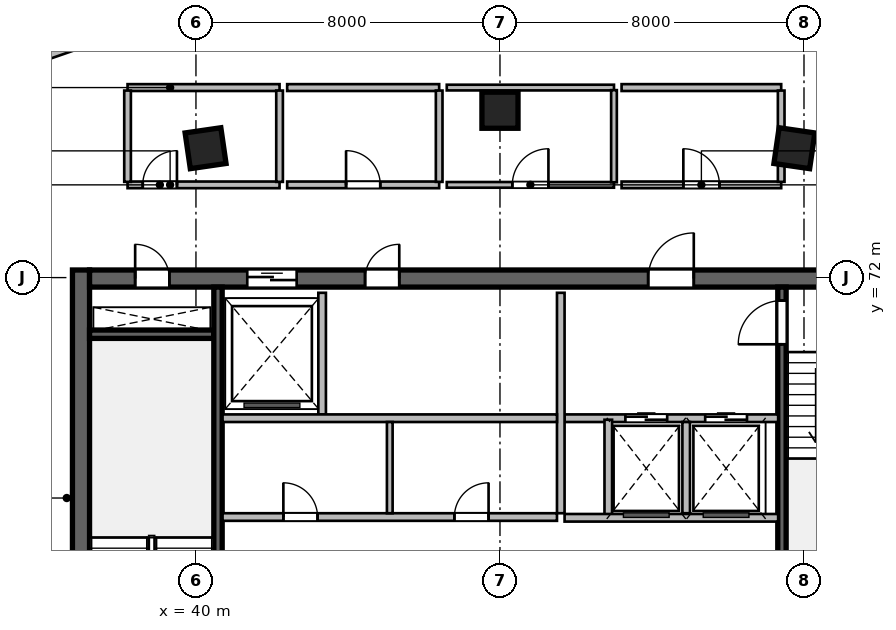
"""IFC4 building model, lengths in metres.
Left out: names, types, materials, properties, quantities, classifications, styles, units other than length and angle.
Written with IfcOpenShell. Run it as: python <this file> out.ifc"""

import sys

from ifc_helpers import new_model, si_unit, direction, frame, frame_2d, origin, origin_2d, place, context, subcontext, project, spatial, rectangle, extrude, source, transform, mapped, element, fill, save


model = new_model("IFC4")
c1 = context("Model", 3, precision=1e-05, world=origin(), true_north=direction((0.0, 1.0)))
c2 = subcontext(c1, "Body", "Model", "MODEL_VIEW")
j1 = project(units=[si_unit("LENGTHUNIT", "METRE"), si_unit("PLANEANGLEUNIT", "RADIAN")], contexts=[c1])
p1 = place(None, origin())
s1 = spatial("IfcSite", under=j1, at=p1, CompositionType="ELEMENT")
p2 = place(p1, origin())
s2 = spatial("IfcBuilding", under=s1, at=p2, CompositionType="ELEMENT")
p3 = place(p2, frame((0.0, 0.0, 215.7)))
s3 = spatial("IfcBuildingStorey", under=s2, at=p3, CompositionType="ELEMENT", Elevation=215.7)
m1 = source(origin(), c2, "Body", "SweptSolid", [
    extrude(rectangle(XDim=12.0, YDim=0.45, at=frame_2d((6.0, 0.0))), origin(), (0.0, 0.0, 1.0), 3.9),
])
p4 = place(p3, frame((36.975, 60.2, 0.0), z_axis=(0.0, 0.0, 1.0), x_axis=(0.0, 1.0, 0.0)))
e1 = element("IfcWall", 1, at=p4, inside=s3, PredefinedType="SHEAR", context=c2, shape_type="MappedRepresentation", body=[
    mapped(m1, transform((0.0, 0.0, 0.0), scale=1.0)),
])
m2 = source(origin(), c2, "Body", "SweptSolid", [
    extrude(rectangle(XDim=21.6, YDim=0.45, at=frame_2d((10.8, 0.0))), origin(), (0.0, 0.0, 1.0), 3.9),
])
p5 = place(p3, frame((37.2, 71.975, 0.0), z_axis=(0.0, 0.0, 1.0), x_axis=(1.0, 0.0, 0.0)))
e2 = element("IfcWall", 2, at=p5, inside=s3, PredefinedType="SHEAR", context=c2, shape_type="MappedRepresentation", body=[
    mapped(m2, transform((0.0, 0.0, 0.0), scale=1.0)),
])
p6 = place(p5, frame((1.2, 0.0, 0.0)))
e3 = element("IfcOpeningElement", 3, at=p6, cuts=e2, PredefinedType="OPENING", context=c2, shape_type="SweptSolid", body=[
    extrude(rectangle(XDim=0.9, YDim=2.1, at=frame_2d((0.45, 1.05))), frame((0.0, 0.235, 0.0), z_axis=(0.0, -1.0, 0.0), x_axis=(1.0, 0.0, 0.0)), (0.0, 0.0, 1.0), 0.47),
])
p7 = place(p5, frame((14.7, 0.0, 0.0)))
e4 = element("IfcOpeningElement", 4, at=p7, cuts=e2, PredefinedType="OPENING", context=c2, shape_type="SweptSolid", body=[
    extrude(rectangle(XDim=1.2, YDim=2.15, at=frame_2d((0.6, 1.075))), frame((0.0, 0.235, 0.0), z_axis=(0.0, -1.0, 0.0), x_axis=(1.0, 0.0, 0.0)), (0.0, 0.0, 1.0), 0.47),
])
p8 = place(p5, frame((4.15, 0.0, 0.0)))
e5 = element("IfcOpeningElement", 5, at=p8, cuts=e2, PredefinedType="OPENING", context=c2, shape_type="SweptSolid", body=[
    extrude(rectangle(XDim=1.3, YDim=2.15, at=frame_2d((0.65, 1.075))), frame((0.0, 0.235, 0.0), z_axis=(0.0, -1.0, 0.0), x_axis=(1.0, 0.0, 0.0)), (0.0, 0.0, 1.0), 0.47),
])
p9 = place(p5, frame((7.25, 0.0, 0.0)))
e6 = element("IfcOpeningElement", 6, at=p9, cuts=e2, PredefinedType="OPENING", context=c2, shape_type="SweptSolid", body=[
    extrude(rectangle(XDim=0.9, YDim=2.1, at=frame_2d((0.45, 1.05))), frame((0.0, 0.235, 0.0), z_axis=(0.0, -1.0, 0.0), x_axis=(1.0, 0.0, 0.0)), (0.0, 0.0, 1.0), 0.47),
])
m3 = source(origin(), c2, "Body", "SweptSolid", [
    extrude(rectangle(XDim=3.27, YDim=0.22, at=frame_2d((1.635, 0.0))), origin(), (0.0, 0.0, 1.0), 3.9),
])
p10 = place(p3, frame((37.2, 70.51, 0.0), z_axis=(0.0, 0.0, 1.0), x_axis=(1.0, 0.0, 0.0)))
e7 = element("IfcWall", 7, at=p10, inside=s3, PredefinedType="SHEAR", context=c2, shape_type="MappedRepresentation", body=[
    mapped(m3, transform((0.0, 0.0, 0.0), scale=1.0)),
])
m4 = source(origin(), c2, "Body", "SweptSolid", [
    extrude(rectangle(XDim=11.1, YDim=0.22, at=frame_2d((5.55, 0.0))), origin(), (0.0, 0.0, 1.0), 3.9),
])
p11 = place(p3, frame((40.58, 60.65, 0.0), z_axis=(0.0, 0.0, 1.0), x_axis=(0.0, 1.0, 0.0)))
e8 = element("IfcWall", 8, at=p11, inside=s3, PredefinedType="SHEAR", context=c2, shape_type="MappedRepresentation", body=[
    mapped(m4, transform((0.0, 0.0, 0.0), scale=1.0)),
])
p12 = place(p3, frame((55.42, 60.65, 0.0), z_axis=(0.0, 0.0, 1.0), x_axis=(0.0, 1.0, 0.0)))
e9 = element("IfcWall", 9, at=p12, inside=s3, PredefinedType="SHEAR", context=c2, shape_type="MappedRepresentation", body=[
    mapped(m4, transform((0.0, 0.0, 0.0), scale=1.0)),
])
p13 = place(p12, frame((9.595, 0.0, 0.0)))
e10 = element("IfcOpeningElement", 10, at=p13, cuts=e9, PredefinedType="OPENING", context=c2, shape_type="SweptSolid", body=[
    extrude(rectangle(XDim=1.15, YDim=2.15, at=frame_2d((0.575, 1.075))), frame((0.0, 0.12, 0.0), z_axis=(0.0, -1.0, 0.0), x_axis=(1.0, 0.0, 0.0)), (0.0, 0.0, 1.0), 0.24),
])
m5 = source(origin(), c2, "Body", "SweptSolid", [
    extrude(rectangle(XDim=0.95, YDim=0.95, at=origin_2d()), origin(), (0.0, 0.0, 1.0), 3.9),
])
for number, where, z_axis, x_axis in (
    (11, (40.253, 75.404, 0.0), (0.0, 0.0, 1.0), (-0.143, 0.99, 0.0)),
    (12, (48.0, 76.404, 0.0), (0.0, 0.0, 1.0), (0.0, 1.0, 0.0)),
    (13, (55.747, 75.404, 0.0), (0.0, 0.0, 1.0), (0.143, 0.99, 0.0)),
):
    element("IfcColumn", number, at=place(p3, frame(where, z_axis=z_axis, x_axis=x_axis)), inside=s3, PredefinedType="COLUMN", context=c2, shape_type="MappedRepresentation", body=[
        mapped(m5, transform((0.0, 0.0, 0.0), scale=1.0)),
    ])
m6 = source(origin(), c2, "Body", "SweptSolid", [
    extrude(rectangle(XDim=4.492, YDim=0.28, at=frame_2d((2.246, 0.0))), origin(), (0.0, 0.0, 1.0), 3.64),
])
p14 = place(p3, frame((35.046, 77.52, 0.0), z_axis=(0.0, 0.0, 1.0), x_axis=(0.944872297412, 0.32743906545, 0.0)))
e14 = element("IfcWall", 14, at=p14, inside=s3, PredefinedType="SOLIDWALL", context=c2, shape_type="MappedRepresentation", body=[
    mapped(m6, transform((0.0, 0.0, 0.0), scale=1.0)),
])
m7 = source(origin(), c2, "Body", "SweptSolid", [
    extrude(rectangle(XDim=5.62, YDim=0.2, at=frame_2d((2.81, 0.0))), origin(), (0.0, 0.0, 1.0), 3.64),
])
p15 = place(p3, frame((49.7, 68.3, 0.0), z_axis=(0.0, 0.0, 1.0), x_axis=(1.0, 0.0, 0.0)))
e15 = element("IfcWall", 15, at=p15, inside=s3, PredefinedType="SOLIDWALL", context=c2, shape_type="MappedRepresentation", body=[
    mapped(m7, transform((0.0, 0.0, 0.0), scale=1.0)),
])
p16 = place(p15, frame((1.6, 0.0, 0.0)))
e16 = element("IfcOpeningElement", 16, at=p16, cuts=e15, PredefinedType="OPENING", context=c2, shape_type="SweptSolid", body=[
    extrude(rectangle(XDim=1.1, YDim=2.15, at=frame_2d((0.55, 1.075))), frame((0.0, 0.11, 0.0), z_axis=(0.0, -1.0, 0.0), x_axis=(1.0, 0.0, 0.0)), (0.0, 0.0, 1.0), 0.22),
])
p17 = place(p15, frame((3.7, 0.0, 0.0)))
e17 = element("IfcOpeningElement", 17, at=p17, cuts=e15, PredefinedType="OPENING", context=c2, shape_type="SweptSolid", body=[
    extrude(rectangle(XDim=1.1, YDim=2.15, at=frame_2d((0.55, 1.075))), frame((0.0, 0.11, 0.0), z_axis=(0.0, -1.0, 0.0), x_axis=(1.0, 0.0, 0.0)), (0.0, 0.0, 1.0), 0.22),
])
m8 = source(origin(), c2, "Body", "SweptSolid", [
    extrude(rectangle(XDim=5.8, YDim=0.2, at=frame_2d((2.9, 0.0))), origin(), (0.0, 0.0, 1.0), 3.64),
])
p18 = place(p3, frame((49.6, 65.8, 0.0), z_axis=(0.0, 0.0, 1.0), x_axis=(0.0, 1.0, 0.0)))
e18 = element("IfcWall", 18, at=p18, inside=s3, PredefinedType="SOLIDWALL", context=c2, shape_type="MappedRepresentation", body=[
    mapped(m8, transform((0.0, 0.0, 0.0), scale=1.0)),
])
m9 = source(origin(), c2, "Body", "SweptSolid", [
    extrude(rectangle(XDim=2.58, YDim=0.2, at=frame_2d((1.29, 0.0))), origin(), (0.0, 0.0, 1.0), 3.64),
])
p19 = place(p3, frame((50.85, 65.68, 0.0), z_axis=(0.0, 0.0, 1.0), x_axis=(0.0, 1.0, 0.0)))
e19 = element("IfcWall", 19, at=p19, inside=s3, PredefinedType="SOLIDWALL", context=c2, shape_type="MappedRepresentation", body=[
    mapped(m9, transform((0.0, 0.0, 0.0), scale=1.0)),
])
m10 = source(origin(), c2, "Body", "SweptSolid", [
    extrude(rectangle(XDim=2.4, YDim=0.2, at=frame_2d((1.2, 0.0))), origin(), (0.0, 0.0, 1.0), 3.64),
])
p20 = place(p3, frame((52.9, 65.8, 0.0), z_axis=(0.0, 0.0, 1.0), x_axis=(0.0, 1.0, 0.0)))
e20 = element("IfcWall", 20, at=p20, inside=s3, PredefinedType="SOLIDWALL", context=c2, shape_type="MappedRepresentation", body=[
    mapped(m10, transform((0.0, 0.0, 0.0), scale=1.0)),
])
p21 = place(p3, frame((49.7, 65.68, 0.0), z_axis=(0.0, 0.0, 1.0), x_axis=(1.0, 0.0, 0.0)))
e21 = element("IfcWall", 21, at=p21, inside=s3, PredefinedType="SOLIDWALL", context=c2, shape_type="MappedRepresentation", body=[
    mapped(m7, transform((0.0, 0.0, 0.0), scale=1.0)),
])
m11 = source(origin(), c2, "Body", "SweptSolid", [
    extrude(rectangle(XDim=3.2, YDim=0.2, at=frame_2d((1.6, 0.0))), origin(), (0.0, 0.0, 1.0), 3.64),
])
p22 = place(p3, frame((43.32, 68.4, 0.0), z_axis=(0.0, 0.0, 1.0), x_axis=(0.0, 1.0, 0.0)))
e22 = element("IfcWall", 22, at=p22, inside=s3, PredefinedType="SOLIDWALL", context=c2, shape_type="MappedRepresentation", body=[
    mapped(m11, transform((0.0, 0.0, 0.0), scale=1.0)),
])
m12 = source(origin(), c2, "Body", "SweptSolid", [
    extrude(rectangle(XDim=8.8, YDim=0.2, at=frame_2d((4.4, 0.0))), origin(), (0.0, 0.0, 1.0), 3.64),
])
p23 = place(p3, frame((40.7, 68.3, 0.0), z_axis=(0.0, 0.0, 1.0), x_axis=(1.0, 0.0, 0.0)))
e23 = element("IfcWall", 23, at=p23, inside=s3, PredefinedType="SOLIDWALL", context=c2, shape_type="MappedRepresentation", body=[
    mapped(m12, transform((0.0, 0.0, 0.0), scale=1.0)),
])
p24 = place(p3, frame((40.7, 65.7, 0.0), z_axis=(0.0, 0.0, 1.0), x_axis=(1.0, 0.0, 0.0)))
e24 = element("IfcWall", 24, at=p24, inside=s3, PredefinedType="SOLIDWALL", context=c2, shape_type="MappedRepresentation", body=[
    mapped(m12, transform((0.0, 0.0, 0.0), scale=1.0)),
])
p25 = place(p24, frame((1.6, 0.0, 0.0)))
e25 = element("IfcOpeningElement", 25, at=p25, cuts=e24, PredefinedType="OPENING", context=c2, shape_type="SweptSolid", body=[
    extrude(rectangle(XDim=0.9, YDim=2.1, at=frame_2d((0.45, 1.05))), frame((0.0, 0.11, 0.0), z_axis=(0.0, -1.0, 0.0), x_axis=(1.0, 0.0, 0.0)), (0.0, 0.0, 1.0), 0.22),
])
p26 = place(p24, frame((6.1, 0.0, 0.0)))
e26 = element("IfcOpeningElement", 26, at=p26, cuts=e24, PredefinedType="OPENING", context=c2, shape_type="SweptSolid", body=[
    extrude(rectangle(XDim=0.9, YDim=2.1, at=frame_2d((0.45, 1.05))), frame((0.0, 0.11, 0.0), z_axis=(0.0, -1.0, 0.0), x_axis=(1.0, 0.0, 0.0)), (0.0, 0.0, 1.0), 0.22),
])
m13 = source(origin(), c2, "Body", "SweptSolid", [
    extrude(rectangle(XDim=2.4, YDim=0.15, at=frame_2d((1.2, 0.0))), origin(), (0.0, 0.0, 1.0), 3.64),
])
p27 = place(p3, frame((45.1, 65.8, 0.0), z_axis=(0.0, 0.0, 1.0), x_axis=(0.0, 1.0, 0.0)))
e27 = element("IfcWall", 27, at=p27, inside=s3, PredefinedType="PARTITIONING", context=c2, shape_type="MappedRepresentation", body=[
    mapped(m13, transform((0.0, 0.0, 0.0), scale=1.0)),
])
m14 = source(origin(), c2, "Body", "SweptSolid", [
    extrude(rectangle(XDim=4.0, YDim=0.175, at=frame_2d((2.0, 0.0))), origin(), (0.0, 0.0, 1.0), 3.64),
])
p28 = place(p3, frame((38.2, 74.44, 0.0), z_axis=(0.0, 0.0, 1.0), x_axis=(1.0, 0.0, 0.0)))
e28 = element("IfcWall", 28, at=p28, inside=s3, PredefinedType="PARTITIONING", context=c2, shape_type="MappedRepresentation", body=[
    mapped(m14, transform((0.0, 0.0, 0.0), scale=1.0)),
])
p29 = place(p28, frame((0.4, 0.0, 0.0)))
e29 = element("IfcOpeningElement", 29, at=p29, cuts=e28, PredefinedType="OPENING", context=c2, shape_type="SweptSolid", body=[
    extrude(rectangle(XDim=0.9, YDim=2.08, at=frame_2d((0.45, 1.04))), frame((0.0, 0.098, 0.0), z_axis=(0.0, -1.0, 0.0), x_axis=(1.0, 0.0, 0.0)), (0.0, 0.0, 1.0), 0.195),
])
m15 = source(origin(), c2, "Body", "SweptSolid", [
    extrude(rectangle(XDim=4.0, YDim=0.18, at=frame_2d((2.0, 0.0))), origin(), (0.0, 0.0, 1.0), 3.64),
])
p30 = place(p3, frame((38.2, 77.0, 0.0), z_axis=(0.0, 0.0, 1.0), x_axis=(1.0, 0.0, 0.0)))
e30 = element("IfcWall", 30, at=p30, inside=s3, PredefinedType="PLUMBINGWALL", context=c2, shape_type="MappedRepresentation", body=[
    mapped(m15, transform((0.0, 0.0, 0.0), scale=1.0)),
])
m16 = source(origin(), c2, "Body", "SweptSolid", [
    extrude(rectangle(XDim=2.403, YDim=0.175, at=frame_2d((1.201, 0.0))), origin(), (0.0, 0.0, 1.0), 3.64),
])
for number, where, z_axis, x_axis in (
    (31, (38.2, 74.519, 0.0), (0.0, 0.0, 1.0), (0.0, 1.0, 0.0)),
    (32, (42.2, 74.519, 0.0), (0.0, 0.0, 1.0), (0.0, 1.0, 0.0)),
):
    element("IfcWall", number, at=place(p3, frame(where, z_axis=z_axis, x_axis=x_axis)), inside=s3, PredefinedType="PARTITIONING", context=c2, shape_type="MappedRepresentation", body=[
        mapped(m16, transform((0.0, 0.0, 0.0), scale=1.0)),
    ])
p31 = place(p3, frame((42.4, 74.44, 0.0), z_axis=(0.0, 0.0, 1.0), x_axis=(1.0, 0.0, 0.0)))
e33 = element("IfcWall", 33, at=p31, inside=s3, PredefinedType="PARTITIONING", context=c2, shape_type="MappedRepresentation", body=[
    mapped(m14, transform((0.0, 0.0, 0.0), scale=1.0)),
])
p32 = place(p31, frame((1.55, 0.0, 0.0)))
e34 = element("IfcOpeningElement", 34, at=p32, cuts=e33, PredefinedType="OPENING", context=c2, shape_type="SweptSolid", body=[
    extrude(rectangle(XDim=0.9, YDim=2.08, at=frame_2d((0.45, 1.04))), frame((0.0, 0.098, 0.0), z_axis=(0.0, -1.0, 0.0), x_axis=(1.0, 0.0, 0.0)), (0.0, 0.0, 1.0), 0.195),
])
p33 = place(p3, frame((42.4, 77.0, 0.0), z_axis=(0.0, 0.0, 1.0), x_axis=(1.0, 0.0, 0.0)))
e35 = element("IfcWall", 35, at=p33, inside=s3, PredefinedType="PLUMBINGWALL", context=c2, shape_type="MappedRepresentation", body=[
    mapped(m15, transform((0.0, 0.0, 0.0), scale=1.0)),
])
p34 = place(p3, frame((46.4, 74.519, 0.0), z_axis=(0.0, 0.0, 1.0), x_axis=(0.0, 1.0, 0.0)))
e36 = element("IfcWall", 36, at=p34, inside=s3, PredefinedType="PARTITIONING", context=c2, shape_type="MappedRepresentation", body=[
    mapped(m16, transform((0.0, 0.0, 0.0), scale=1.0)),
])
m17 = source(origin(), c2, "Body", "SweptSolid", [
    extrude(rectangle(XDim=4.4, YDim=0.15, at=frame_2d((2.2, 0.0))), origin(), (0.0, 0.0, 1.0), 3.64),
])
p35 = place(p3, frame((46.6, 74.44, 0.0), z_axis=(0.0, 0.0, 1.0), x_axis=(1.0, 0.0, 0.0)))
e37 = element("IfcWall", 37, at=p35, inside=s3, PredefinedType="PARTITIONING", context=c2, shape_type="MappedRepresentation", body=[
    mapped(m17, transform((0.0, 0.0, 0.0), scale=1.0)),
])
p36 = place(p35, frame((1.725, 0.0, 0.0)))
e38 = element("IfcOpeningElement", 38, at=p36, cuts=e37, PredefinedType="OPENING", context=c2, shape_type="SweptSolid", body=[
    extrude(rectangle(XDim=0.95, YDim=2.1, at=frame_2d((0.475, 1.05))), frame((0.0, 0.085, 0.0), z_axis=(0.0, -1.0, 0.0), x_axis=(1.0, 0.0, 0.0)), (0.0, 0.0, 1.0), 0.17),
])
p37 = place(p3, frame((46.6, 77.0, 0.0), z_axis=(0.0, 0.0, 1.0), x_axis=(1.0, 0.0, 0.0)))
e39 = element("IfcWall", 39, at=p37, inside=s3, PredefinedType="PARTITIONING", context=c2, shape_type="MappedRepresentation", body=[
    mapped(m17, transform((0.0, 0.0, 0.0), scale=1.0)),
])
m18 = source(origin(), c2, "Body", "SweptSolid", [
    extrude(rectangle(XDim=2.425, YDim=0.15, at=frame_2d((1.212, 0.0))), origin(), (0.0, 0.0, 1.0), 3.64),
])
p38 = place(p3, frame((51.0, 74.508, 0.0), z_axis=(0.0, 0.0, 1.0), x_axis=(0.0, 1.0, 0.0)))
e40 = element("IfcWall", 40, at=p38, inside=s3, PredefinedType="PARTITIONING", context=c2, shape_type="MappedRepresentation", body=[
    mapped(m18, transform((0.0, 0.0, 0.0), scale=1.0)),
])
m19 = source(origin(), c2, "Body", "SweptSolid", [
    extrude(rectangle(XDim=4.2, YDim=0.175, at=frame_2d((2.1, 0.0))), origin(), (0.0, 0.0, 1.0), 3.64),
])
p39 = place(p3, frame((51.2, 74.44, 0.0), z_axis=(0.0, 0.0, 1.0), x_axis=(1.0, 0.0, 0.0)))
e41 = element("IfcWall", 41, at=p39, inside=s3, PredefinedType="PARTITIONING", context=c2, shape_type="MappedRepresentation", body=[
    mapped(m19, transform((0.0, 0.0, 0.0), scale=1.0)),
])
p40 = place(p39, frame((1.625, 0.0, 0.0)))
e42 = element("IfcOpeningElement", 42, at=p40, cuts=e41, PredefinedType="OPENING", context=c2, shape_type="SweptSolid", body=[
    extrude(rectangle(XDim=0.95, YDim=2.12, at=frame_2d((0.475, 1.06))), frame((0.0, 0.098, 0.0), z_axis=(0.0, -1.0, 0.0), x_axis=(1.0, 0.0, 0.0)), (0.0, 0.0, 1.0), 0.195),
])
m20 = source(origin(), c2, "Body", "SweptSolid", [
    extrude(rectangle(XDim=4.2, YDim=0.18, at=frame_2d((2.1, 0.0))), origin(), (0.0, 0.0, 1.0), 3.64),
])
p41 = place(p3, frame((51.2, 77.0, 0.0), z_axis=(0.0, 0.0, 1.0), x_axis=(1.0, 0.0, 0.0)))
e43 = element("IfcWall", 43, at=p41, inside=s3, PredefinedType="PLUMBINGWALL", context=c2, shape_type="MappedRepresentation", body=[
    mapped(m20, transform((0.0, 0.0, 0.0), scale=1.0)),
])
p42 = place(p3, frame((55.4, 74.519, 0.0), z_axis=(0.0, 0.0, 1.0), x_axis=(0.0, 1.0, 0.0)))
e44 = element("IfcWall", 44, at=p42, inside=s3, PredefinedType="PARTITIONING", context=c2, shape_type="MappedRepresentation", body=[
    mapped(m16, transform((0.0, 0.0, 0.0), scale=1.0)),
])
m21 = source(origin(), c2, "Body", "SweptSolid", [
    extrude(rectangle(XDim=13.694, YDim=0.195, at=frame_2d((6.847, 0.0))), origin(), (0.0, 0.0, 1.0), 3.64),
])
p43 = place(p3, frame((36.5, 63.216, 0.0), z_axis=(0.0, 0.0, 1.0), x_axis=(-0.268753576604, 0.963208967495, 0.0)))
e45 = element("IfcWall", 45, at=p43, inside=s3, PredefinedType="PARTITIONING", context=c2, shape_type="MappedRepresentation", body=[
    mapped(m21, transform((0.0, 0.0, 0.0), scale=1.0)),
])
m22 = source(origin(), c2, "Body", "SweptSolid", [
    extrude(rectangle(XDim=0.9, YDim=2.1, at=frame_2d((0.45, 1.05))), frame((0.0, 0.025, 0.0), z_axis=(0.0, -1.0, 0.0), x_axis=(1.0, 0.0, 0.0)), (0.0, 0.0, 1.0), 0.05),
])
p44 = place(p6, origin())
e46 = element("IfcDoor", 46, at=p44, inside=s3, OperationType="SINGLE_SWING_LEFT", PredefinedType="DOOR", context=c2, shape_type="MappedRepresentation", body=[
    mapped(m22, transform((0.0, 0.0, 0.0), scale=1.0)),
])
fill(e3, e46)
m23 = source(origin(), c2, "Body", "SweptSolid", [
    extrude(rectangle(XDim=1.15, YDim=2.15, at=frame_2d((0.575, 1.075))), frame((0.0, 0.025, 0.0), z_axis=(0.0, -1.0, 0.0), x_axis=(1.0, 0.0, 0.0)), (0.0, 0.0, 1.0), 0.05),
])
p45 = place(p13, origin())
e47 = element("IfcDoor", 47, at=p45, inside=s3, OperationType="SINGLE_SWING_LEFT", PredefinedType="DOOR", context=c2, shape_type="MappedRepresentation", body=[
    mapped(m23, transform((0.0, 0.0, 0.0), scale=1.0)),
])
fill(e10, e47)
m24 = source(origin(), c2, "Body", "SweptSolid", [
    extrude(rectangle(XDim=1.2, YDim=2.15, at=frame_2d((0.6, 1.075))), frame((0.0, 0.025, 0.0), z_axis=(0.0, -1.0, 0.0), x_axis=(1.0, 0.0, 0.0)), (0.0, 0.0, 1.0), 0.05),
])
p46 = place(p7, origin())
e48 = element("IfcDoor", 48, at=p46, inside=s3, OperationType="SINGLE_SWING_RIGHT", PredefinedType="DOOR", context=c2, shape_type="MappedRepresentation", body=[
    mapped(m24, transform((0.0, 0.0, 0.0), scale=1.0)),
])
fill(e4, e48)
m25 = source(origin(), c2, "Body", "SweptSolid", [
    extrude(rectangle(XDim=1.1, YDim=2.15, at=frame_2d((0.55, 1.075))), frame((0.0, 0.025, 0.0), z_axis=(0.0, -1.0, 0.0), x_axis=(1.0, 0.0, 0.0)), (0.0, 0.0, 1.0), 0.05),
])
p47 = place(p16, origin())
e49 = element("IfcDoor", 49, at=p47, inside=s3, OperationType="DOUBLE_DOOR_SLIDING", PredefinedType="DOOR", context=c2, shape_type="MappedRepresentation", body=[
    mapped(m25, transform((0.0, 0.0, 0.0), scale=1.0)),
])
fill(e16, e49)
p48 = place(p17, origin())
e50 = element("IfcDoor", 50, at=p48, inside=s3, OperationType="DOUBLE_DOOR_SLIDING", PredefinedType="DOOR", context=c2, shape_type="MappedRepresentation", body=[
    mapped(m25, transform((0.0, 0.0, 0.0), scale=1.0)),
])
fill(e17, e50)
m26 = source(origin(), c2, "Body", "SweptSolid", [
    extrude(rectangle(XDim=1.3, YDim=2.15, at=frame_2d((0.65, 1.075))), frame((0.0, 0.025, 0.0), z_axis=(0.0, -1.0, 0.0), x_axis=(1.0, 0.0, 0.0)), (0.0, 0.0, 1.0), 0.05),
])
p49 = place(p8, origin())
e51 = element("IfcDoor", 51, at=p49, inside=s3, OperationType="DOUBLE_DOOR_SLIDING", PredefinedType="DOOR", context=c2, shape_type="MappedRepresentation", body=[
    mapped(m26, transform((0.0, 0.0, 0.0), scale=1.0)),
])
fill(e5, e51)
p50 = place(p9, origin())
e52 = element("IfcDoor", 52, at=p50, inside=s3, OperationType="SINGLE_SWING_RIGHT", PredefinedType="DOOR", context=c2, shape_type="MappedRepresentation", body=[
    mapped(m22, transform((0.0, 0.0, 0.0), scale=1.0)),
])
fill(e6, e52)
p51 = place(p25, origin())
e53 = element("IfcDoor", 53, at=p51, inside=s3, OperationType="SINGLE_SWING_LEFT", PredefinedType="DOOR", context=c2, shape_type="MappedRepresentation", body=[
    mapped(m22, transform((0.0, 0.0, 0.0), scale=1.0)),
])
fill(e25, e53)
p52 = place(p26, origin())
e54 = element("IfcDoor", 54, at=p52, inside=s3, OperationType="SINGLE_SWING_RIGHT", PredefinedType="DOOR", context=c2, shape_type="MappedRepresentation", body=[
    mapped(m22, transform((0.0, 0.0, 0.0), scale=1.0)),
])
fill(e26, e54)
m27 = source(origin(), c2, "Body", "SweptSolid", [
    extrude(rectangle(XDim=0.9, YDim=2.08, at=frame_2d((0.45, 1.04))), frame((0.0, 0.025, 0.0), z_axis=(0.0, -1.0, 0.0), x_axis=(1.0, 0.0, 0.0)), (0.0, 0.0, 1.0), 0.05),
])
p53 = place(p29, origin())
e55 = element("IfcDoor", 55, at=p53, inside=s3, OperationType="SINGLE_SWING_RIGHT", PredefinedType="DOOR", context=c2, shape_type="MappedRepresentation", body=[
    mapped(m27, transform((0.0, 0.0, 0.0), scale=1.0)),
])
fill(e29, e55)
p54 = place(p32, origin())
e56 = element("IfcDoor", 56, at=p54, inside=s3, OperationType="SINGLE_SWING_LEFT", PredefinedType="DOOR", context=c2, shape_type="MappedRepresentation", body=[
    mapped(m27, transform((0.0, 0.0, 0.0), scale=1.0)),
])
fill(e34, e56)
m28 = source(origin(), c2, "Body", "SweptSolid", [
    extrude(rectangle(XDim=0.95, YDim=2.1, at=frame_2d((0.475, 1.05))), frame((0.0, 0.025, 0.0), z_axis=(0.0, -1.0, 0.0), x_axis=(1.0, 0.0, 0.0)), (0.0, 0.0, 1.0), 0.05),
])
p55 = place(p36, origin())
e57 = element("IfcDoor", 57, at=p55, inside=s3, OperationType="SINGLE_SWING_RIGHT", PredefinedType="DOOR", context=c2, shape_type="MappedRepresentation", body=[
    mapped(m28, transform((0.0, 0.0, 0.0), scale=1.0)),
])
fill(e38, e57)
m29 = source(origin(), c2, "Body", "SweptSolid", [
    extrude(rectangle(XDim=0.95, YDim=2.12, at=frame_2d((0.475, 1.06))), frame((0.0, 0.025, 0.0), z_axis=(0.0, -1.0, 0.0), x_axis=(1.0, 0.0, 0.0)), (0.0, 0.0, 1.0), 0.05),
])
p56 = place(p40, origin())
e58 = element("IfcDoor", 58, at=p56, inside=s3, OperationType="SINGLE_SWING_LEFT", PredefinedType="DOOR", context=c2, shape_type="MappedRepresentation", body=[
    mapped(m29, transform((0.0, 0.0, 0.0), scale=1.0)),
])
fill(e42, e58)
save(model, sys.argv[1])
